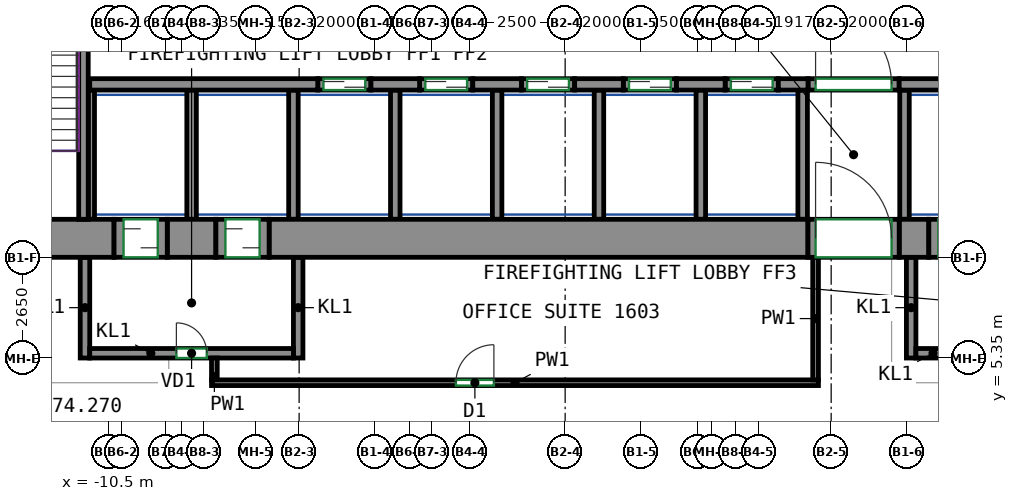
"""IFC4 building model, lengths in metres.
Left out: names, types, materials, properties, quantities, classifications, styles, units other than length and angle.
Written with IfcOpenShell. Run it as: python <this file> out.ifc"""

import sys

from ifc_helpers import new_model, si_unit, direction, frame, frame_2d, origin, place, context, subcontext, project, spatial, rectangle, extrude, source, transform, mapped, element, fill, save


model = new_model("IFC4")
c1 = context("Model", 3, precision=1e-05, world=origin(), true_north=direction((0.0, 1.0)))
c2 = subcontext(c1, "Body", "Model", "MODEL_VIEW")
j1 = project(units=[si_unit("LENGTHUNIT", "METRE"), si_unit("PLANEANGLEUNIT", "RADIAN")], contexts=[c1])
p1 = place(None, origin())
s1 = spatial("IfcSite", under=j1, at=p1, CompositionType="ELEMENT")
p2 = place(p1, origin())
s2 = spatial("IfcBuilding", under=s1, at=p2, CompositionType="ELEMENT")
p3 = place(p2, frame((0.0, 0.0, 71.2)))
s3 = spatial("IfcBuildingStorey", under=s2, at=p3, CompositionType="ELEMENT", Elevation=71.2)
m1 = source(origin(), c2, "Body", "SweptSolid", [
    extrude(rectangle(XDim=5.63, YDim=1.0, at=frame_2d((2.815, 0.0))), origin(), (0.0, 0.0, 1.0), 3.72),
])
p4 = place(p3, frame((-16.0, 8.5, 0.0), z_axis=(0.0, 0.0, 1.0), x_axis=(1.0, 0.0, 0.0)))
e1 = element("IfcWall", 1, at=p4, inside=s3, PredefinedType="SHEAR", context=c2, shape_type="MappedRepresentation", body=[
    mapped(m1, transform((0.0, 0.0, 0.0))),
])
p5 = place(p4, frame((2.25, 0.0, 0.0)))
e2 = element("IfcOpeningElement", 2, at=p5, cuts=e1, PredefinedType="OPENING", context=c2, shape_type="SweptSolid", body=[
    extrude(rectangle(XDim=1.2, YDim=2.1, at=frame_2d((0.6, 1.05))), frame((0.0, 0.51, 0.0), z_axis=(0.0, -1.0, 0.0), x_axis=(1.0, 0.0, 0.0)), (0.0, 0.0, 1.0), 1.02),
])
m2 = source(origin(), c2, "Body", "SweptSolid", [
    extrude(rectangle(XDim=1.28, YDim=1.0, at=frame_2d((0.64, 0.0))), origin(), (0.0, 0.0, 1.0), 3.72),
])
p6 = place(p3, frame((-8.97, 8.5, 0.0), z_axis=(0.0, 0.0, 1.0), x_axis=(1.0, 0.0, 0.0)))
e3 = element("IfcWall", 3, at=p6, inside=s3, PredefinedType="SHEAR", context=c2, shape_type="MappedRepresentation", body=[
    mapped(m2, transform((0.0, 0.0, 0.0))),
])
m3 = source(origin(), c2, "Body", "SweptSolid", [
    extrude(rectangle(XDim=14.18, YDim=1.0, at=frame_2d((7.09, 0.0))), origin(), (0.0, 0.0, 1.0), 3.72),
])
p7 = place(p3, frame((-6.29, 8.5, 0.0), z_axis=(0.0, 0.0, 1.0), x_axis=(1.0, 0.0, 0.0)))
e4 = element("IfcWall", 4, at=p7, inside=s3, PredefinedType="SHEAR", context=c2, shape_type="MappedRepresentation", body=[
    mapped(m3, transform((0.0, 0.0, 0.0))),
])
m4 = source(origin(), c2, "Body", "SweptSolid", [
    extrude(rectangle(XDim=0.78, YDim=1.0, at=frame_2d((0.39, 0.0))), origin(), (0.0, 0.0, 1.0), 3.72),
])
p8 = place(p3, frame((10.29, 8.5, 0.0), z_axis=(0.0, 0.0, 1.0), x_axis=(1.0, 0.0, 0.0)))
e5 = element("IfcWall", 5, at=p8, inside=s3, PredefinedType="SHEAR", context=c2, shape_type="MappedRepresentation", body=[
    mapped(m4, transform((0.0, 0.0, 0.0))),
])
m5 = source(origin(), c2, "Body", "SweptSolid", [
    extrude(rectangle(XDim=7.75, YDim=0.25, at=frame_2d((3.875, 0.0))), origin(), (0.0, 0.0, 1.0), 3.72),
])
p9 = place(p3, frame((-11.175, 9.0, 0.0), z_axis=(0.0, 0.0, 1.0), x_axis=(0.0, 1.0, 0.0)))
e6 = element("IfcWall", 6, at=p9, inside=s3, PredefinedType="SHEAR", context=c2, shape_type="MappedRepresentation", body=[
    mapped(m5, transform((0.0, 0.0, 0.0))),
])
m6 = source(origin(), c2, "Body", "SweptSolid", [
    extrude(rectangle(XDim=6.0, YDim=0.3, at=frame_2d((3.0, 0.0))), origin(), (0.0, 0.0, 1.0), 3.72),
])
p10 = place(p3, frame((-11.01, 12.55, 0.0), z_axis=(0.0, 0.0, 1.0), x_axis=(1.0, 0.0, 0.0)))
e7 = element("IfcWall", 7, at=p10, inside=s3, PredefinedType="SHEAR", context=c2, shape_type="MappedRepresentation", body=[
    mapped(m6, transform((0.0, 0.0, 0.0))),
])
m7 = source(origin(), c2, "Body", "SweptSolid", [
    extrude(rectangle(XDim=1.28, YDim=0.3, at=frame_2d((0.64, 0.0))), origin(), (0.0, 0.0, 1.0), 3.72),
])
for number, where, z_axis, x_axis in (
    (8, (-3.61, 12.55, 0.0), (0.0, 0.0, 1.0), (1.0, 0.0, 0.0)),
    (9, (-0.93, 12.55, 0.0), (0.0, 0.0, 1.0), (1.0, 0.0, 0.0)),
    (10, (1.75, 12.55, 0.0), (0.0, 0.0, 1.0), (1.0, 0.0, 0.0)),
    (11, (4.43, 12.55, 0.0), (0.0, 0.0, 1.0), (1.0, 0.0, 0.0)),
):
    element("IfcWall", number, at=place(p3, frame(where, z_axis=z_axis, x_axis=x_axis)), inside=s3, PredefinedType="SHEAR", context=c2, shape_type="MappedRepresentation", body=[
        mapped(m7, transform((0.0, 0.0, 0.0))),
    ])
m8 = source(origin(), c2, "Body", "SweptSolid", [
    extrude(rectangle(XDim=0.78, YDim=0.3, at=frame_2d((0.39, 0.0))), origin(), (0.0, 0.0, 1.0), 3.72),
])
p11 = place(p3, frame((7.11, 12.55, 0.0), z_axis=(0.0, 0.0, 1.0), x_axis=(1.0, 0.0, 0.0)))
e12 = element("IfcWall", 12, at=p11, inside=s3, PredefinedType="SHEAR", context=c2, shape_type="MappedRepresentation", body=[
    mapped(m8, transform((0.0, 0.0, 0.0))),
])
m9 = source(origin(), c2, "Body", "SweptSolid", [
    extrude(rectangle(XDim=2.82, YDim=0.3, at=frame_2d((1.41, 0.0))), origin(), (0.0, 0.0, 1.0), 3.72),
])
p12 = place(p3, frame((10.29, 12.55, 0.0), z_axis=(0.0, 0.0, 1.0), x_axis=(1.0, 0.0, 0.0)))
e13 = element("IfcWall", 13, at=p12, inside=s3, PredefinedType="SHEAR", context=c2, shape_type="MappedRepresentation", body=[
    mapped(m9, transform((0.0, 0.0, 0.0))),
])
m10 = source(origin(), c2, "Body", "SweptSolid", [
    extrude(rectangle(XDim=1.4, YDim=0.3, at=frame_2d((0.7, 0.0))), origin(), (0.0, 0.0, 1.0), 3.72),
])
p13 = place(p3, frame((-5.01, 12.55, 0.0), z_axis=(0.0, 0.0, 1.0), x_axis=(1.0, 0.0, 0.0)))
e14 = element("IfcWall", 14, at=p13, inside=s3, PredefinedType="PARTITIONING", context=c2, shape_type="MappedRepresentation", body=[
    mapped(m10, transform((0.0, 0.0, 0.0))),
])
p14 = place(p13, frame((0.15, 0.0, 0.0)))
e15 = element("IfcOpeningElement", 15, at=p14, cuts=e14, PredefinedType="OPENING", context=c2, shape_type="SweptSolid", body=[
    extrude(rectangle(XDim=1.1, YDim=2.1, at=frame_2d((0.55, 1.05))), frame((0.0, 0.16, 0.0), z_axis=(0.0, -1.0, 0.0), x_axis=(1.0, 0.0, 0.0)), (0.0, 0.0, 1.0), 0.32),
])
m11 = source(origin(), c2, "Body", "SweptSolid", [
    extrude(rectangle(XDim=1.4, YDim=0.3, at=frame_2d((0.7, 0.0))), origin(), (0.0, 0.0, 1.0), 3.72),
])
p15 = place(p3, frame((-2.33, 12.55, 0.0), z_axis=(0.0, 0.0, 1.0), x_axis=(1.0, 0.0, 0.0)))
e16 = element("IfcWall", 16, at=p15, inside=s3, PredefinedType="PARTITIONING", context=c2, shape_type="MappedRepresentation", body=[
    mapped(m11, transform((0.0, 0.0, 0.0))),
])
p16 = place(p15, frame((0.15, 0.0, 0.0)))
e17 = element("IfcOpeningElement", 17, at=p16, cuts=e16, PredefinedType="OPENING", context=c2, shape_type="SweptSolid", body=[
    extrude(rectangle(XDim=1.1, YDim=2.1, at=frame_2d((0.55, 1.05))), frame((0.0, 0.16, 0.0), z_axis=(0.0, -1.0, 0.0), x_axis=(1.0, 0.0, 0.0)), (0.0, 0.0, 1.0), 0.32),
])
p17 = place(p3, frame((0.35, 12.55, 0.0), z_axis=(0.0, 0.0, 1.0), x_axis=(1.0, 0.0, 0.0)))
e18 = element("IfcWall", 18, at=p17, inside=s3, PredefinedType="PARTITIONING", context=c2, shape_type="MappedRepresentation", body=[
    mapped(m10, transform((0.0, 0.0, 0.0))),
])
p18 = place(p17, frame((0.15, 0.0, 0.0)))
e19 = element("IfcOpeningElement", 19, at=p18, cuts=e18, PredefinedType="OPENING", context=c2, shape_type="SweptSolid", body=[
    extrude(rectangle(XDim=1.1, YDim=2.1, at=frame_2d((0.55, 1.05))), frame((0.0, 0.16, 0.0), z_axis=(0.0, -1.0, 0.0), x_axis=(1.0, 0.0, 0.0)), (0.0, 0.0, 1.0), 0.32),
])
p19 = place(p3, frame((3.03, 12.55, 0.0), z_axis=(0.0, 0.0, 1.0), x_axis=(1.0, 0.0, 0.0)))
e20 = element("IfcWall", 20, at=p19, inside=s3, PredefinedType="PARTITIONING", context=c2, shape_type="MappedRepresentation", body=[
    mapped(m10, transform((0.0, 0.0, 0.0))),
])
p20 = place(p19, frame((0.15, 0.0, 0.0)))
e21 = element("IfcOpeningElement", 21, at=p20, cuts=e20, PredefinedType="OPENING", context=c2, shape_type="SweptSolid", body=[
    extrude(rectangle(XDim=1.1, YDim=2.1, at=frame_2d((0.55, 1.05))), frame((0.0, 0.16, 0.0), z_axis=(0.0, -1.0, 0.0), x_axis=(1.0, 0.0, 0.0)), (0.0, 0.0, 1.0), 0.32),
])
p21 = place(p3, frame((5.71, 12.55, 0.0), z_axis=(0.0, 0.0, 1.0), x_axis=(1.0, 0.0, 0.0)))
e22 = element("IfcWall", 22, at=p21, inside=s3, PredefinedType="PARTITIONING", context=c2, shape_type="MappedRepresentation", body=[
    mapped(m11, transform((0.0, 0.0, 0.0))),
])
p22 = place(p21, frame((0.15, 0.0, 0.0)))
e23 = element("IfcOpeningElement", 23, at=p22, cuts=e22, PredefinedType="OPENING", context=c2, shape_type="SweptSolid", body=[
    extrude(rectangle(XDim=1.1, YDim=2.1, at=frame_2d((0.55, 1.05))), frame((0.0, 0.16, 0.0), z_axis=(0.0, -1.0, 0.0), x_axis=(1.0, 0.0, 0.0)), (0.0, 0.0, 1.0), 0.32),
])
m12 = source(origin(), c2, "Body", "SweptSolid", [
    extrude(rectangle(XDim=2.4, YDim=0.3, at=frame_2d((1.2, 0.0))), origin(), (0.0, 0.0, 1.0), 3.72),
])
p23 = place(p3, frame((7.89, 12.55, 0.0), z_axis=(0.0, 0.0, 1.0), x_axis=(1.0, 0.0, 0.0)))
e24 = element("IfcWall", 24, at=p23, inside=s3, PredefinedType="PARTITIONING", context=c2, shape_type="MappedRepresentation", body=[
    mapped(m12, transform((0.0, 0.0, 0.0))),
])
p24 = place(p23, frame((0.2, 0.0, 0.0)))
e25 = element("IfcOpeningElement", 25, at=p24, cuts=e24, PredefinedType="OPENING", context=c2, shape_type="SweptSolid", body=[
    extrude(rectangle(XDim=2.0, YDim=2.1, at=frame_2d((1.0, 1.05))), frame((0.0, 0.16, 0.0), z_axis=(0.0, -1.0, 0.0), x_axis=(1.0, 0.0, 0.0)), (0.0, 0.0, 1.0), 0.32),
])
m13 = source(origin(), c2, "Body", "SweptSolid", [
    extrude(rectangle(XDim=2.65, YDim=0.25, at=frame_2d((1.325, 0.0))), origin(), (0.0, 0.0, 1.0), 3.72),
])
for number, where, z_axis, x_axis in (
    (26, (-11.135, 5.35, 0.0), (0.0, 0.0, 1.0), (0.0, 1.0, 0.0)),
    (27, (-5.525, 5.35, 0.0), (0.0, 0.0, 1.0), (0.0, 1.0, 0.0)),
):
    element("IfcWall", number, at=place(p3, frame(where, z_axis=z_axis, x_axis=x_axis)), inside=s3, PredefinedType="PARTITIONING", context=c2, shape_type="MappedRepresentation", body=[
        mapped(m13, transform((0.0, 0.0, 0.0))),
    ])
m14 = source(origin(), c2, "Body", "SweptSolid", [
    extrude(rectangle(XDim=5.36, YDim=0.25, at=frame_2d((2.68, 0.0))), origin(), (0.0, 0.0, 1.0), 3.72),
])
p25 = place(p3, frame((-11.01, 5.475, 0.0), z_axis=(0.0, 0.0, 1.0), x_axis=(1.0, 0.0, 0.0)))
e28 = element("IfcWall", 28, at=p25, inside=s3, PredefinedType="PARTITIONING", context=c2, shape_type="MappedRepresentation", body=[
    mapped(m14, transform((0.0, 0.0, 0.0))),
])
p26 = place(p25, frame((2.28, 0.0, 0.0)))
e29 = element("IfcOpeningElement", 29, at=p26, cuts=e28, PredefinedType="OPENING", context=c2, shape_type="SweptSolid", body=[
    extrude(rectangle(XDim=0.8, YDim=2.0, at=frame_2d((0.4, 1.0))), frame((0.0, 0.135, 0.0), z_axis=(0.0, -1.0, 0.0), x_axis=(1.0, 0.0, 0.0)), (0.0, 0.0, 1.0), 0.27),
])
p27 = place(p3, frame((10.605, 5.35, 0.0), z_axis=(0.0, 0.0, 1.0), x_axis=(0.0, 1.0, 0.0)))
e30 = element("IfcWall", 30, at=p27, inside=s3, PredefinedType="PARTITIONING", context=c2, shape_type="MappedRepresentation", body=[
    mapped(m13, transform((0.0, 0.0, 0.0))),
])
m15 = source(origin(), c2, "Body", "SweptSolid", [
    extrude(rectangle(XDim=3.0, YDim=0.25, at=frame_2d((1.5, 0.0))), origin(), (0.0, 0.0, 1.0), 3.72),
])
p28 = place(p3, frame((10.73, 5.475, 0.0), z_axis=(0.0, 0.0, 1.0), x_axis=(1.0, 0.0, 0.0)))
e31 = element("IfcWall", 31, at=p28, inside=s3, PredefinedType="PARTITIONING", context=c2, shape_type="MappedRepresentation", body=[
    mapped(m15, transform((0.0, 0.0, 0.0))),
])
p29 = place(p28, frame((1.1, 0.0, 0.0)))
e32 = element("IfcOpeningElement", 32, at=p29, cuts=e31, PredefinedType="OPENING", context=c2, shape_type="SweptSolid", body=[
    extrude(rectangle(XDim=0.8, YDim=2.0, at=frame_2d((0.4, 1.0))), frame((0.0, 0.135, 0.0), z_axis=(0.0, -1.0, 0.0), x_axis=(1.0, 0.0, 0.0)), (0.0, 0.0, 1.0), 0.27),
])
m16 = source(origin(), c2, "Body", "SweptSolid", [
    extrude(rectangle(XDim=3.4, YDim=0.25, at=frame_2d((1.7, 0.0))), origin(), (0.0, 0.0, 1.0), 3.72),
])
for number, where, z_axis, x_axis in (
    (33, (10.43, 9.0, 0.0), (0.0, 0.0, 1.0), (0.0, 1.0, 0.0)),
    (34, (2.39, 9.0, 0.0), (0.0, 0.0, 1.0), (0.0, 1.0, 0.0)),
    (35, (5.07, 9.0, 0.0), (0.0, 0.0, 1.0), (0.0, 1.0, 0.0)),
    (36, (7.75, 9.0, 0.0), (0.0, 0.0, 1.0), (0.0, 1.0, 0.0)),
    (37, (-0.29, 9.0, 0.0), (0.0, 0.0, 1.0), (0.0, 1.0, 0.0)),
):
    element("IfcWall", number, at=place(p3, frame(where, z_axis=z_axis, x_axis=x_axis)), inside=s3, PredefinedType="PARTITIONING", context=c2, shape_type="MappedRepresentation", body=[
        mapped(m16, transform((0.0, 0.0, 0.0))),
    ])
m17 = source(origin(), c2, "Body", "SweptSolid", [
    extrude(rectangle(XDim=3.4, YDim=0.165, at=frame_2d((1.7, 0.0))), origin(), (0.0, 0.0, 1.0), 3.72),
])
p30 = place(p3, frame((-10.968, 9.0, 0.0), z_axis=(0.0, 0.0, 1.0), x_axis=(0.0, 1.0, 0.0)))
e38 = element("IfcWall", 38, at=p30, inside=s3, PredefinedType="PARTITIONING", context=c2, shape_type="MappedRepresentation", body=[
    mapped(m17, transform((0.0, 0.0, 0.0))),
])
for number, where, z_axis, x_axis in (
    (39, (-2.97, 9.0, 0.0), (0.0, 0.0, 1.0), (0.0, 1.0, 0.0)),
    (40, (-5.65, 9.0, 0.0), (0.0, 0.0, 1.0), (0.0, 1.0, 0.0)),
    (41, (-8.33, 9.0, 0.0), (0.0, 0.0, 1.0), (0.0, 1.0, 0.0)),
):
    element("IfcWall", number, at=place(p3, frame(where, z_axis=z_axis, x_axis=x_axis)), inside=s3, PredefinedType="PARTITIONING", context=c2, shape_type="MappedRepresentation", body=[
        mapped(m16, transform((0.0, 0.0, 0.0))),
    ])
m18 = source(origin(), c2, "Body", "SweptSolid", [
    extrude(rectangle(XDim=1.4, YDim=1.0, at=frame_2d((0.7, 0.0))), origin(), (0.0, 0.0, 1.0), 2.7),
])
p31 = place(p3, frame((-10.37, 8.5, 0.0), z_axis=(0.0, 0.0, 1.0), x_axis=(1.0, 0.0, 0.0)))
e42 = element("IfcWall", 42, at=p31, inside=s3, PredefinedType="PARTITIONING", context=c2, shape_type="MappedRepresentation", body=[
    mapped(m18, transform((0.0, 0.0, 0.0))),
])
p32 = place(p31, frame((0.25, 0.0, 0.0)))
e43 = element("IfcOpeningElement", 43, at=p32, cuts=e42, PredefinedType="OPENING", context=c2, shape_type="SweptSolid", body=[
    extrude(rectangle(XDim=0.9, YDim=2.1, at=frame_2d((0.45, 1.05))), frame((0.0, 0.51, 0.0), z_axis=(0.0, -1.0, 0.0), x_axis=(1.0, 0.0, 0.0)), (0.0, 0.0, 1.0), 1.02),
])
m19 = source(origin(), c2, "Body", "SweptSolid", [
    extrude(rectangle(XDim=1.4, YDim=1.0, at=frame_2d((0.7, 0.0))), origin(), (0.0, 0.0, 1.0), 2.7),
])
p33 = place(p3, frame((-7.69, 8.5, 0.0), z_axis=(0.0, 0.0, 1.0), x_axis=(1.0, 0.0, 0.0)))
e44 = element("IfcWall", 44, at=p33, inside=s3, PredefinedType="PARTITIONING", context=c2, shape_type="MappedRepresentation", body=[
    mapped(m19, transform((0.0, 0.0, 0.0))),
])
p34 = place(p33, frame((0.25, 0.0, 0.0)))
e45 = element("IfcOpeningElement", 45, at=p34, cuts=e44, PredefinedType="OPENING", context=c2, shape_type="SweptSolid", body=[
    extrude(rectangle(XDim=0.9, YDim=2.1, at=frame_2d((0.45, 1.05))), frame((0.0, 0.51, 0.0), z_axis=(0.0, -1.0, 0.0), x_axis=(1.0, 0.0, 0.0)), (0.0, 0.0, 1.0), 1.02),
])
m20 = source(origin(), c2, "Body", "SweptSolid", [
    extrude(rectangle(XDim=2.4, YDim=1.0, at=frame_2d((1.2, 0.0))), origin(), (0.0, 0.0, 1.0), 2.7),
])
p35 = place(p3, frame((7.89, 8.5, 0.0), z_axis=(0.0, 0.0, 1.0), x_axis=(1.0, 0.0, 0.0)))
e46 = element("IfcWall", 46, at=p35, inside=s3, PredefinedType="PARTITIONING", context=c2, shape_type="MappedRepresentation", body=[
    mapped(m20, transform((0.0, 0.0, 0.0))),
])
p36 = place(p35, frame((0.2, 0.0, 0.0)))
e47 = element("IfcOpeningElement", 47, at=p36, cuts=e46, PredefinedType="OPENING", context=c2, shape_type="SweptSolid", body=[
    extrude(rectangle(XDim=2.0, YDim=2.1, at=frame_2d((1.0, 1.05))), frame((0.0, 0.51, 0.0), z_axis=(0.0, -1.0, 0.0), x_axis=(1.0, 0.0, 0.0)), (0.0, 0.0, 1.0), 1.02),
])
p37 = place(p3, frame((11.07, 8.5, 0.0), z_axis=(0.0, 0.0, 1.0), x_axis=(1.0, 0.0, 0.0)))
e48 = element("IfcWall", 48, at=p37, inside=s3, PredefinedType="PARTITIONING", context=c2, shape_type="MappedRepresentation", body=[
    mapped(m19, transform((0.0, 0.0, 0.0))),
])
p38 = place(p37, frame((0.25, 0.0, 0.0)))
e49 = element("IfcOpeningElement", 49, at=p38, cuts=e48, PredefinedType="OPENING", context=c2, shape_type="SweptSolid", body=[
    extrude(rectangle(XDim=0.9, YDim=2.1, at=frame_2d((0.45, 1.05))), frame((0.0, 0.51, 0.0), z_axis=(0.0, -1.0, 0.0), x_axis=(1.0, 0.0, 0.0)), (0.0, 0.0, 1.0), 1.02),
])
p39 = place(p3, frame((-7.73, 4.775, 0.0), z_axis=(0.0, 0.0, 1.0), x_axis=(0.0, 1.0, 0.0)))
e50 = element("IfcWall", 50, at=p39, inside=s3, PredefinedType="PARTITIONING", context=c2, shape_type="SweptSolid", body=[
    extrude(rectangle(XDim=0.575, YDim=0.15, at=frame_2d((0.288, 0.0))), origin(), (0.0, 0.0, 1.0), 3.72),
])
p40 = place(p3, frame((-7.805, 4.7, 0.0), z_axis=(0.0, 0.0, 1.0), x_axis=(1.0, 0.0, 0.0)))
e51 = element("IfcWall", 51, at=p40, inside=s3, PredefinedType="PARTITIONING", context=c2, shape_type="SweptSolid", body=[
    extrude(rectangle(XDim=15.97, YDim=0.15, at=frame_2d((7.985, 0.0))), origin(), (0.0, 0.0, 1.0), 3.72),
])
p41 = place(p40, frame((6.43, 0.0, 0.0)))
e52 = element("IfcOpeningElement", 52, at=p41, cuts=e51, PredefinedType="OPENING", context=c2, shape_type="SweptSolid", body=[
    extrude(rectangle(XDim=1.0, YDim=2.1, at=frame_2d((0.5, 1.05))), frame((0.0, 0.085, 0.0), z_axis=(0.0, -1.0, 0.0), x_axis=(1.0, 0.0, 0.0)), (0.0, 0.0, 1.0), 0.17),
])
p42 = place(p3, frame((8.09, 8.0, 0.0), z_axis=(0.0, 0.0, 1.0), x_axis=(0.0, -1.0, 0.0)))
e53 = element("IfcWall", 53, at=p42, inside=s3, PredefinedType="PARTITIONING", context=c2, shape_type="SweptSolid", body=[
    extrude(rectangle(XDim=3.225, YDim=0.15, at=frame_2d((1.613, 0.0))), origin(), (0.0, 0.0, 1.0), 3.72),
])
p43 = place(p24, origin())
e54 = element("IfcDoor", 54, at=p43, inside=s3, OperationType="DOUBLE_DOOR_SINGLE_SWING", PredefinedType="DOOR", context=c2, shape_type="SweptSolid", body=[
    extrude(rectangle(XDim=2.0, YDim=2.1, at=frame_2d((1.0, 1.05))), frame((0.0, 0.025, 0.0), z_axis=(0.0, -1.0, 0.0), x_axis=(1.0, 0.0, 0.0)), (0.0, 0.0, 1.0), 0.05),
])
fill(e25, e54)
p44 = place(p36, origin())
e55 = element("IfcDoor", 55, at=p44, inside=s3, OperationType="DOUBLE_DOOR_SINGLE_SWING", PredefinedType="DOOR", context=c2, shape_type="SweptSolid", body=[
    extrude(rectangle(XDim=2.0, YDim=2.1, at=frame_2d((1.0, 1.05))), frame((0.0, 0.405, 0.0), z_axis=(0.0, -1.0, 0.0), x_axis=(1.0, 0.0, 0.0)), (0.0, 0.0, 1.0), 0.05),
])
fill(e47, e55)
p45 = place(p26, origin())
e56 = element("IfcDoor", 56, at=p45, inside=s3, OperationType="SINGLE_SWING_LEFT", PredefinedType="DOOR", context=c2, shape_type="SweptSolid", body=[
    extrude(rectangle(XDim=0.8, YDim=2.0, at=frame_2d((0.4, 1.0))), frame((0.0, 0.025, 0.0), z_axis=(0.0, -1.0, 0.0), x_axis=(1.0, 0.0, 0.0)), (0.0, 0.0, 1.0), 0.05),
])
fill(e29, e56)
p46 = place(p32, origin())
e57 = element("IfcDoor", 57, at=p46, inside=s3, OperationType="SLIDING_TO_LEFT", PredefinedType="DOOR", context=c2, shape_type="SweptSolid", body=[
    extrude(rectangle(XDim=0.9, YDim=2.1, at=frame_2d((0.45, 1.05))), frame((0.0, 0.405, 0.0), z_axis=(0.0, -1.0, 0.0), x_axis=(1.0, 0.0, 0.0)), (0.0, 0.0, 1.0), 0.05),
])
fill(e43, e57)
p47 = place(p34, origin())
e58 = element("IfcDoor", 58, at=p47, inside=s3, OperationType="SLIDING_TO_RIGHT", PredefinedType="DOOR", context=c2, shape_type="SweptSolid", body=[
    extrude(rectangle(XDim=0.9, YDim=2.1, at=frame_2d((0.45, 1.05))), frame((0.0, 0.405, 0.0), z_axis=(0.0, -1.0, 0.0), x_axis=(1.0, 0.0, 0.0)), (0.0, 0.0, 1.0), 0.05),
])
fill(e45, e58)
p48 = place(p14, origin())
e59 = element("IfcDoor", 59, at=p48, inside=s3, OperationType="DOUBLE_DOOR_SLIDING", PredefinedType="DOOR", context=c2, shape_type="SweptSolid", body=[
    extrude(rectangle(XDim=1.1, YDim=2.1, at=frame_2d((0.55, 1.05))), frame((0.0, 0.025, 0.0), z_axis=(0.0, -1.0, 0.0), x_axis=(1.0, 0.0, 0.0)), (0.0, 0.0, 1.0), 0.05),
])
fill(e15, e59)
p49 = place(p16, origin())
e60 = element("IfcDoor", 60, at=p49, inside=s3, OperationType="DOUBLE_DOOR_SLIDING", PredefinedType="DOOR", context=c2, shape_type="SweptSolid", body=[
    extrude(rectangle(XDim=1.1, YDim=2.1, at=frame_2d((0.55, 1.05))), frame((0.0, 0.025, 0.0), z_axis=(0.0, -1.0, 0.0), x_axis=(1.0, 0.0, 0.0)), (0.0, 0.0, 1.0), 0.05),
])
fill(e17, e60)
p50 = place(p18, origin())
e61 = element("IfcDoor", 61, at=p50, inside=s3, OperationType="DOUBLE_DOOR_SLIDING", PredefinedType="DOOR", context=c2, shape_type="SweptSolid", body=[
    extrude(rectangle(XDim=1.1, YDim=2.1, at=frame_2d((0.55, 1.05))), frame((0.0, 0.025, 0.0), z_axis=(0.0, -1.0, 0.0), x_axis=(1.0, 0.0, 0.0)), (0.0, 0.0, 1.0), 0.05),
])
fill(e19, e61)
p51 = place(p20, origin())
e62 = element("IfcDoor", 62, at=p51, inside=s3, OperationType="DOUBLE_DOOR_SLIDING", PredefinedType="DOOR", context=c2, shape_type="SweptSolid", body=[
    extrude(rectangle(XDim=1.1, YDim=2.1, at=frame_2d((0.55, 1.05))), frame((0.0, 0.025, 0.0), z_axis=(0.0, -1.0, 0.0), x_axis=(1.0, 0.0, 0.0)), (0.0, 0.0, 1.0), 0.05),
])
fill(e21, e62)
p52 = place(p22, origin())
e63 = element("IfcDoor", 63, at=p52, inside=s3, OperationType="DOUBLE_DOOR_SLIDING", PredefinedType="DOOR", context=c2, shape_type="SweptSolid", body=[
    extrude(rectangle(XDim=1.1, YDim=2.1, at=frame_2d((0.55, 1.05))), frame((0.0, 0.025, 0.0), z_axis=(0.0, -1.0, 0.0), x_axis=(1.0, 0.0, 0.0)), (0.0, 0.0, 1.0), 0.05),
])
fill(e23, e63)
p53 = place(p41, origin())
e64 = element("IfcDoor", 64, at=p53, inside=s3, OperationType="SINGLE_SWING_RIGHT", PredefinedType="DOOR", context=c2, shape_type="SweptSolid", body=[
    extrude(rectangle(XDim=1.0, YDim=2.1, at=frame_2d((0.5, 1.05))), frame((0.0, 0.025, 0.0), z_axis=(0.0, -1.0, 0.0), x_axis=(1.0, 0.0, 0.0)), (0.0, 0.0, 1.0), 0.05),
])
fill(e52, e64)
save(model, sys.argv[1])
